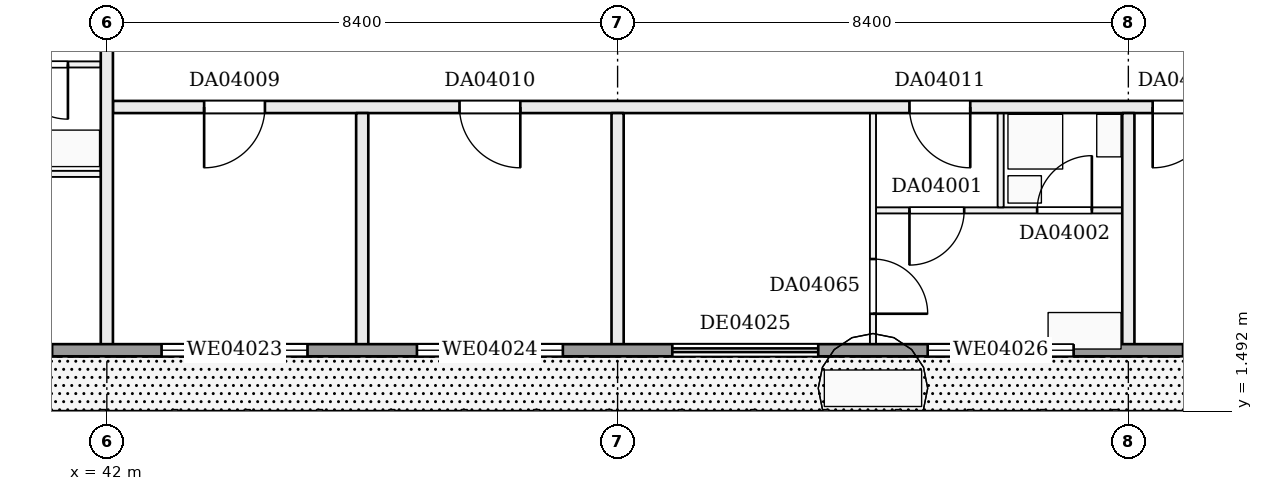
"""IFC4 building model, lengths in metres.
Left out: names, types, materials, properties, quantities, classifications, styles, units other than length and angle.
Written with IfcOpenShell. Run it as: python <this file> out.ifc"""

import sys

from ifc_helpers import new_model, si_unit, direction, frame, frame_2d, origin, place, context, subcontext, project, spatial, rectangle, extrude, element, fill, save


model = new_model("IFC4")
c1 = context("Model", 3, precision=1e-05, world=origin(), true_north=direction((0.0, 1.0)))
c2 = subcontext(c1, "Body", "Model", "MODEL_VIEW")
j1 = project(units=[si_unit("LENGTHUNIT", "METRE"), si_unit("PLANEANGLEUNIT", "RADIAN")], contexts=[c1])
p1 = place(None, origin())
s1 = spatial("IfcSite", under=j1, at=p1, CompositionType="ELEMENT")
p2 = place(p1, origin())
s2 = spatial("IfcBuilding", under=s1, at=p2, CompositionType="ELEMENT")
p3 = place(p2, frame((0.0, 0.0, 25.2)))
s3 = spatial("IfcBuildingStorey", under=s2, at=p3, CompositionType="ELEMENT", Elevation=25.2)
p4 = place(p3, frame((54.65, 4.8, 0.0), z_axis=(0.0, 0.0, 1.0), x_axis=(1.0, 0.0, 0.0)))
e1 = element("IfcWall", 1, at=p4, inside=s3, PredefinedType="PARTITIONING", context=c2, shape_type="SweptSolid", body=[
    extrude(rectangle(XDim=4.05, YDim=0.1, at=frame_2d((2.025, 0.0))), origin(), (0.0, 0.0, 1.0), 3.22),
])
p5 = place(p4, frame((0.55, 0.0, 0.0)))
e2 = element("IfcOpeningElement", 2, at=p5, cuts=e1, PredefinedType="OPENING", context=c2, shape_type="SweptSolid", body=[
    extrude(rectangle(XDim=0.9, YDim=2.1, at=frame_2d((0.45, 1.05))), frame((0.0, 0.06, 0.0), z_axis=(0.0, -1.0, 0.0), x_axis=(1.0, 0.0, 0.0)), (0.0, 0.0, 1.0), 0.12),
])
p6 = place(p4, frame((2.65, 0.0, 0.0)))
e3 = element("IfcOpeningElement", 3, at=p6, cuts=e1, PredefinedType="OPENING", context=c2, shape_type="SweptSolid", body=[
    extrude(rectangle(XDim=0.9, YDim=2.1, at=frame_2d((0.45, 1.05))), frame((0.0, 0.06, 0.0), z_axis=(0.0, -1.0, 0.0), x_axis=(1.0, 0.0, 0.0)), (0.0, 0.0, 1.0), 0.12),
])
p7 = place(p3, frame((37.9, 5.4, 0.0), z_axis=(0.0, 0.0, 1.0), x_axis=(1.0, 0.0, 0.0)))
e4 = element("IfcWall", 4, at=p7, inside=s3, PredefinedType="PARTITIONING", context=c2, shape_type="SweptSolid", body=[
    extrude(rectangle(XDim=4.0, YDim=0.1, at=frame_2d((2.0, 0.0))), origin(), (0.0, 0.0, 1.0), 3.22),
])
p8 = place(p7, frame((1.5, 0.0, 0.0)))
e5 = element("IfcOpeningElement", 5, at=p8, cuts=e4, PredefinedType="OPENING", context=c2, shape_type="SweptSolid", body=[
    extrude(rectangle(XDim=0.9, YDim=2.1, at=frame_2d((0.45, 1.05))), frame((0.0, 0.06, 0.0), z_axis=(0.0, -1.0, 0.0), x_axis=(1.0, 0.0, 0.0)), (0.0, 0.0, 1.0), 0.12),
])
p9 = place(p3, frame((42.1, 6.5, 0.0), z_axis=(0.0, 0.0, 1.0), x_axis=(1.0, 0.0, 0.0)))
e6 = element("IfcWall", 6, at=p9, inside=s3, PredefinedType="PARTITIONING", context=c2, shape_type="SweptSolid", body=[
    extrude(rectangle(XDim=18.7, YDim=0.2, at=frame_2d((9.35, 0.0))), origin(), (0.0, 0.0, 1.0), 3.22),
])
p10 = place(p9, frame((1.5, 0.0, 0.0)))
e7 = element("IfcOpeningElement", 7, at=p10, cuts=e6, PredefinedType="OPENING", context=c2, shape_type="SweptSolid", body=[
    extrude(rectangle(XDim=1.0, YDim=2.1, at=frame_2d((0.5, 1.05))), frame((0.0, 0.11, 0.0), z_axis=(0.0, -1.0, 0.0), x_axis=(1.0, 0.0, 0.0)), (0.0, 0.0, 1.0), 0.22),
])
p11 = place(p9, frame((5.7, 0.0, 0.0)))
e8 = element("IfcOpeningElement", 8, at=p11, cuts=e6, PredefinedType="OPENING", context=c2, shape_type="SweptSolid", body=[
    extrude(rectangle(XDim=1.0, YDim=2.1, at=frame_2d((0.5, 1.05))), frame((0.0, 0.11, 0.0), z_axis=(0.0, -1.0, 0.0), x_axis=(1.0, 0.0, 0.0)), (0.0, 0.0, 1.0), 0.22),
])
p12 = place(p9, frame((13.1, 0.0, 0.0)))
e9 = element("IfcOpeningElement", 9, at=p12, cuts=e6, PredefinedType="OPENING", context=c2, shape_type="SweptSolid", body=[
    extrude(rectangle(XDim=1.0, YDim=2.1, at=frame_2d((0.5, 1.05))), frame((0.0, 0.11, 0.0), z_axis=(0.0, -1.0, 0.0), x_axis=(1.0, 0.0, 0.0)), (0.0, 0.0, 1.0), 0.22),
])
p13 = place(p9, frame((17.1, 0.0, 0.0)))
e10 = element("IfcOpeningElement", 10, at=p13, cuts=e6, PredefinedType="OPENING", context=c2, shape_type="SweptSolid", body=[
    extrude(rectangle(XDim=1.0, YDim=2.1, at=frame_2d((0.5, 1.05))), frame((0.0, 0.11, 0.0), z_axis=(0.0, -1.0, 0.0), x_axis=(1.0, 0.0, 0.0)), (0.0, 0.0, 1.0), 0.22),
])
p14 = place(p3, frame((37.9, 7.2, 0.0), z_axis=(0.0, 0.0, 1.0), x_axis=(1.0, 0.0, 0.0)))
e11 = element("IfcWall", 11, at=p14, inside=s3, PredefinedType="PARTITIONING", context=c2, shape_type="SweptSolid", body=[
    extrude(rectangle(XDim=4.0, YDim=0.1, at=frame_2d((2.0, 0.0))), origin(), (0.0, 0.0, 1.0), 3.22),
])
p15 = place(p14, frame((0.4, 0.0, 0.0)))
e12 = element("IfcOpeningElement", 12, at=p15, cuts=e11, PredefinedType="OPENING", context=c2, shape_type="SweptSolid", body=[
    extrude(rectangle(XDim=0.9, YDim=2.1, at=frame_2d((0.45, 1.05))), frame((0.0, 0.06, 0.0), z_axis=(0.0, -1.0, 0.0), x_axis=(1.0, 0.0, 0.0)), (0.0, 0.0, 1.0), 0.12),
])
p16 = place(p14, frame((2.56, 0.0, 0.0)))
e13 = element("IfcOpeningElement", 13, at=p16, cuts=e11, PredefinedType="OPENING", context=c2, shape_type="SweptSolid", body=[
    extrude(rectangle(XDim=0.9, YDim=2.1, at=frame_2d((0.45, 1.05))), frame((0.0, 0.06, 0.0), z_axis=(0.0, -1.0, 0.0), x_axis=(1.0, 0.0, 0.0)), (0.0, 0.0, 1.0), 0.12),
])
p17 = place(p3, frame((42.0, 2.5, 0.0), z_axis=(0.0, 0.0, 1.0), x_axis=(0.0, 1.0, 0.0)))
e14 = element("IfcWall", 14, at=p17, inside=s3, PredefinedType="PARTITIONING", context=c2, shape_type="SweptSolid", body=[
    extrude(rectangle(XDim=5.9, YDim=0.2, at=frame_2d((2.95, 0.0))), origin(), (0.0, 0.0, 1.0), 3.22),
])
for number, where, z_axis, x_axis in (
    (15, (46.2, 2.5, 0.0), (0.0, 0.0, 1.0), (0.0, 1.0, 0.0)),
    (16, (50.4, 2.5, 0.0), (0.0, 0.0, 1.0), (0.0, 1.0, 0.0)),
):
    element("IfcWall", number, at=place(p3, frame(where, z_axis=z_axis, x_axis=x_axis)), inside=s3, PredefinedType="PARTITIONING", context=c2, shape_type="SweptSolid", body=[
        extrude(rectangle(XDim=3.9, YDim=0.2, at=frame_2d((1.95, 0.0))), origin(), (0.0, 0.0, 1.0), 3.22),
    ])
p18 = place(p3, frame((54.6, 2.5, 0.0), z_axis=(0.0, 0.0, 1.0), x_axis=(0.0, 1.0, 0.0)))
e17 = element("IfcWall", 17, at=p18, inside=s3, PredefinedType="PARTITIONING", context=c2, shape_type="SweptSolid", body=[
    extrude(rectangle(XDim=3.9, YDim=0.1, at=frame_2d((1.95, 0.0))), origin(), (0.0, 0.0, 1.0), 3.22),
])
p19 = place(p18, frame((0.6, 0.0, 0.0)))
e18 = element("IfcOpeningElement", 18, at=p19, cuts=e17, PredefinedType="OPENING", context=c2, shape_type="SweptSolid", body=[
    extrude(rectangle(XDim=0.9, YDim=2.1, at=frame_2d((0.45, 1.05))), frame((0.0, 0.06, 0.0), z_axis=(0.0, -1.0, 0.0), x_axis=(1.0, 0.0, 0.0)), (0.0, 0.0, 1.0), 0.12),
])
p20 = place(p3, frame((56.7, 4.85, 0.0), z_axis=(0.0, 0.0, 1.0), x_axis=(0.0, 1.0, 0.0)))
e19 = element("IfcWall", 19, at=p20, inside=s3, PredefinedType="PARTITIONING", context=c2, shape_type="SweptSolid", body=[
    extrude(rectangle(XDim=1.55, YDim=0.1, at=frame_2d((0.775, 0.0))), origin(), (0.0, 0.0, 1.0), 3.22),
])
p21 = place(p3, frame((58.8, 2.5, 0.0), z_axis=(0.0, 0.0, 1.0), x_axis=(0.0, 1.0, 0.0)))
e20 = element("IfcWall", 20, at=p21, inside=s3, PredefinedType="PARTITIONING", context=c2, shape_type="SweptSolid", body=[
    extrude(rectangle(XDim=3.9, YDim=0.2, at=frame_2d((1.95, 0.0))), origin(), (0.0, 0.0, 1.0), 3.22),
])
p22 = place(p3, frame((4.8, 2.5, 0.0), z_axis=(0.0, 0.0, 1.0), x_axis=(1.0, 0.0, 0.0)))
e21 = element("IfcWall", 21, at=p22, inside=s3, PredefinedType="SOLIDWALL", context=c2, shape_type="SweptSolid", body=[
    extrude(rectangle(XDim=57.6, YDim=0.2, at=frame_2d((28.8, 0.0))), origin(), (0.0, 0.0, 1.0), 3.22),
])
p23 = place(p22, frame((0.3, 0.0, 0.0)))
e22 = element("IfcOpeningElement", 22, at=p23, cuts=e21, PredefinedType="OPENING", context=c2, shape_type="SweptSolid", body=[
    extrude(rectangle(XDim=2.4, YDim=2.2, at=frame_2d((1.2, 1.1))), frame((0.0, 0.11, 0.0), z_axis=(0.0, -1.0, 0.0), x_axis=(1.0, 0.0, 0.0)), (0.0, 0.0, 1.0), 0.22),
])
p24 = place(p22, frame((4.5, 0.0, 0.0)))
e23 = element("IfcOpeningElement", 23, at=p24, cuts=e21, PredefinedType="OPENING", context=c2, shape_type="SweptSolid", body=[
    extrude(rectangle(XDim=2.4, YDim=2.2, at=frame_2d((1.2, 1.1))), frame((0.0, 0.11, 0.0), z_axis=(0.0, -1.0, 0.0), x_axis=(1.0, 0.0, 0.0)), (0.0, 0.0, 1.0), 0.22),
])
p25 = place(p22, frame((8.7, 0.0, 0.9)))
e24 = element("IfcOpeningElement", 24, at=p25, cuts=e21, PredefinedType="OPENING", context=c2, shape_type="SweptSolid", body=[
    extrude(rectangle(XDim=2.4, YDim=1.5, at=frame_2d((1.2, 0.75))), frame((0.0, 0.11, 0.0), z_axis=(0.0, -1.0, 0.0), x_axis=(1.0, 0.0, 0.0)), (0.0, 0.0, 1.0), 0.22),
])
p26 = place(p22, frame((12.9, 0.0, 0.9)))
e25 = element("IfcOpeningElement", 25, at=p26, cuts=e21, PredefinedType="OPENING", context=c2, shape_type="SweptSolid", body=[
    extrude(rectangle(XDim=2.4, YDim=1.5, at=frame_2d((1.2, 0.75))), frame((0.0, 0.11, 0.0), z_axis=(0.0, -1.0, 0.0), x_axis=(1.0, 0.0, 0.0)), (0.0, 0.0, 1.0), 0.22),
])
p27 = place(p22, frame((17.1, 0.0, 0.0)))
e26 = element("IfcOpeningElement", 26, at=p27, cuts=e21, PredefinedType="OPENING", context=c2, shape_type="SweptSolid", body=[
    extrude(rectangle(XDim=2.4, YDim=2.2, at=frame_2d((1.2, 1.1))), frame((0.0, 0.11, 0.0), z_axis=(0.0, -1.0, 0.0), x_axis=(1.0, 0.0, 0.0)), (0.0, 0.0, 1.0), 0.22),
])
p28 = place(p22, frame((21.3, 0.0, 0.9)))
e27 = element("IfcOpeningElement", 27, at=p28, cuts=e21, PredefinedType="OPENING", context=c2, shape_type="SweptSolid", body=[
    extrude(rectangle(XDim=2.4, YDim=1.5, at=frame_2d((1.2, 0.75))), frame((0.0, 0.11, 0.0), z_axis=(0.0, -1.0, 0.0), x_axis=(1.0, 0.0, 0.0)), (0.0, 0.0, 1.0), 0.22),
])
p29 = place(p22, frame((25.5, 0.0, 0.9)))
e28 = element("IfcOpeningElement", 28, at=p29, cuts=e21, PredefinedType="OPENING", context=c2, shape_type="SweptSolid", body=[
    extrude(rectangle(XDim=2.4, YDim=1.5, at=frame_2d((1.2, 0.75))), frame((0.0, 0.11, 0.0), z_axis=(0.0, -1.0, 0.0), x_axis=(1.0, 0.0, 0.0)), (0.0, 0.0, 1.0), 0.22),
])
p30 = place(p22, frame((29.7, 0.0, 0.9)))
e29 = element("IfcOpeningElement", 29, at=p30, cuts=e21, PredefinedType="OPENING", context=c2, shape_type="SweptSolid", body=[
    extrude(rectangle(XDim=2.4, YDim=1.5, at=frame_2d((1.2, 0.75))), frame((0.0, 0.11, 0.0), z_axis=(0.0, -1.0, 0.0), x_axis=(1.0, 0.0, 0.0)), (0.0, 0.0, 1.0), 0.22),
])
p31 = place(p22, frame((33.9, 0.0, 0.0)))
e30 = element("IfcOpeningElement", 30, at=p31, cuts=e21, PredefinedType="OPENING", context=c2, shape_type="SweptSolid", body=[
    extrude(rectangle(XDim=2.4, YDim=2.2, at=frame_2d((1.2, 1.1))), frame((0.0, 0.11, 0.0), z_axis=(0.0, -1.0, 0.0), x_axis=(1.0, 0.0, 0.0)), (0.0, 0.0, 1.0), 0.22),
])
p32 = place(p22, frame((38.1, 0.0, 0.9)))
e31 = element("IfcOpeningElement", 31, at=p32, cuts=e21, PredefinedType="OPENING", context=c2, shape_type="SweptSolid", body=[
    extrude(rectangle(XDim=2.4, YDim=1.5, at=frame_2d((1.2, 0.75))), frame((0.0, 0.11, 0.0), z_axis=(0.0, -1.0, 0.0), x_axis=(1.0, 0.0, 0.0)), (0.0, 0.0, 1.0), 0.22),
])
p33 = place(p22, frame((42.3, 0.0, 0.9)))
e32 = element("IfcOpeningElement", 32, at=p33, cuts=e21, PredefinedType="OPENING", context=c2, shape_type="SweptSolid", body=[
    extrude(rectangle(XDim=2.4, YDim=1.5, at=frame_2d((1.2, 0.75))), frame((0.0, 0.11, 0.0), z_axis=(0.0, -1.0, 0.0), x_axis=(1.0, 0.0, 0.0)), (0.0, 0.0, 1.0), 0.22),
])
p34 = place(p22, frame((46.5, 0.0, 0.0)))
e33 = element("IfcOpeningElement", 33, at=p34, cuts=e21, PredefinedType="OPENING", context=c2, shape_type="SweptSolid", body=[
    extrude(rectangle(XDim=2.4, YDim=2.2, at=frame_2d((1.2, 1.1))), frame((0.0, 0.11, 0.0), z_axis=(0.0, -1.0, 0.0), x_axis=(1.0, 0.0, 0.0)), (0.0, 0.0, 1.0), 0.22),
])
p35 = place(p22, frame((50.7, 0.0, 0.9)))
e34 = element("IfcOpeningElement", 34, at=p35, cuts=e21, PredefinedType="OPENING", context=c2, shape_type="SweptSolid", body=[
    extrude(rectangle(XDim=2.4, YDim=1.5, at=frame_2d((1.2, 0.75))), frame((0.0, 0.11, 0.0), z_axis=(0.0, -1.0, 0.0), x_axis=(1.0, 0.0, 0.0)), (0.0, 0.0, 1.0), 0.22),
])
p36 = place(p22, frame((54.9, 0.0, 0.9)))
e35 = element("IfcOpeningElement", 35, at=p36, cuts=e21, PredefinedType="OPENING", context=c2, shape_type="SweptSolid", body=[
    extrude(rectangle(XDim=2.4, YDim=1.5, at=frame_2d((1.2, 0.75))), frame((0.0, 0.11, 0.0), z_axis=(0.0, -1.0, 0.0), x_axis=(1.0, 0.0, 0.0)), (0.0, 0.0, 1.0), 0.22),
])
p37 = place(p5, frame((0.9, 0.0, 0.0), z_axis=(0.0, 0.0, 1.0), x_axis=(-1.0, 0.0, 0.0)))
e36 = element("IfcDoor", 36, at=p37, inside=s3, OperationType="SINGLE_SWING_RIGHT", PredefinedType="DOOR", context=c2, shape_type="SweptSolid", body=[
    extrude(rectangle(XDim=0.9, YDim=2.1, at=frame_2d((0.45, 1.05))), frame((0.0, 0.025, 0.0), z_axis=(0.0, -1.0, 0.0), x_axis=(1.0, 0.0, 0.0)), (0.0, 0.0, 1.0), 0.05),
])
fill(e2, e36)
p38 = place(p6, origin())
e37 = element("IfcDoor", 37, at=p38, inside=s3, OperationType="SINGLE_SWING_RIGHT", PredefinedType="DOOR", context=c2, shape_type="SweptSolid", body=[
    extrude(rectangle(XDim=0.9, YDim=2.1, at=frame_2d((0.45, 1.05))), frame((0.0, 0.025, 0.0), z_axis=(0.0, -1.0, 0.0), x_axis=(1.0, 0.0, 0.0)), (0.0, 0.0, 1.0), 0.05),
])
fill(e3, e37)
p39 = place(p10, frame((1.0, 0.0, 0.0), z_axis=(0.0, 0.0, 1.0), x_axis=(-1.0, 0.0, 0.0)))
e38 = element("IfcDoor", 38, at=p39, inside=s3, OperationType="SINGLE_SWING_RIGHT", PredefinedType="DOOR", context=c2, shape_type="SweptSolid", body=[
    extrude(rectangle(XDim=1.0, YDim=2.1, at=frame_2d((0.5, 1.05))), frame((0.0, 0.025, 0.0), z_axis=(0.0, -1.0, 0.0), x_axis=(1.0, 0.0, 0.0)), (0.0, 0.0, 1.0), 0.05),
])
fill(e7, e38)
p40 = place(p11, frame((1.0, 0.0, 0.0), z_axis=(0.0, 0.0, 1.0), x_axis=(-1.0, 0.0, 0.0)))
e39 = element("IfcDoor", 39, at=p40, inside=s3, OperationType="SINGLE_SWING_LEFT", PredefinedType="DOOR", context=c2, shape_type="SweptSolid", body=[
    extrude(rectangle(XDim=1.0, YDim=2.1, at=frame_2d((0.5, 1.05))), frame((0.0, 0.025, 0.0), z_axis=(0.0, -1.0, 0.0), x_axis=(1.0, 0.0, 0.0)), (0.0, 0.0, 1.0), 0.05),
])
fill(e8, e39)
p41 = place(p12, frame((1.0, 0.0, 0.0), z_axis=(0.0, 0.0, 1.0), x_axis=(-1.0, 0.0, 0.0)))
e40 = element("IfcDoor", 40, at=p41, inside=s3, OperationType="SINGLE_SWING_LEFT", PredefinedType="DOOR", context=c2, shape_type="SweptSolid", body=[
    extrude(rectangle(XDim=1.0, YDim=2.1, at=frame_2d((0.5, 1.05))), frame((0.0, 0.025, 0.0), z_axis=(0.0, -1.0, 0.0), x_axis=(1.0, 0.0, 0.0)), (0.0, 0.0, 1.0), 0.05),
])
fill(e9, e40)
p42 = place(p13, frame((1.0, 0.0, 0.0), z_axis=(0.0, 0.0, 1.0), x_axis=(-1.0, 0.0, 0.0)))
e41 = element("IfcDoor", 41, at=p42, inside=s3, OperationType="SINGLE_SWING_RIGHT", PredefinedType="DOOR", context=c2, shape_type="SweptSolid", body=[
    extrude(rectangle(XDim=1.0, YDim=2.1, at=frame_2d((0.5, 1.05))), frame((0.0, 0.025, 0.0), z_axis=(0.0, -1.0, 0.0), x_axis=(1.0, 0.0, 0.0)), (0.0, 0.0, 1.0), 0.05),
])
fill(e10, e41)
p43 = place(p16, frame((0.9, 0.0, 0.0), z_axis=(0.0, 0.0, 1.0), x_axis=(-1.0, 0.0, 0.0)))
e42 = element("IfcDoor", 42, at=p43, inside=s3, OperationType="SINGLE_SWING_LEFT", PredefinedType="DOOR", context=c2, shape_type="SweptSolid", body=[
    extrude(rectangle(XDim=0.9, YDim=2.1, at=frame_2d((0.45, 1.05))), frame((0.0, 0.025, 0.0), z_axis=(0.0, -1.0, 0.0), x_axis=(1.0, 0.0, 0.0)), (0.0, 0.0, 1.0), 0.05),
])
fill(e13, e42)
p44 = place(p19, frame((0.9, 0.0, 0.0), z_axis=(0.0, 0.0, 1.0), x_axis=(-1.0, 0.0, 0.0)))
e43 = element("IfcDoor", 43, at=p44, inside=s3, OperationType="SINGLE_SWING_RIGHT", PredefinedType="DOOR", context=c2, shape_type="SweptSolid", body=[
    extrude(rectangle(XDim=0.9, YDim=2.1, at=frame_2d((0.45, 1.05))), frame((0.0, 0.025, 0.0), z_axis=(0.0, -1.0, 0.0), x_axis=(1.0, 0.0, 0.0)), (0.0, 0.0, 1.0), 0.05),
])
fill(e18, e43)
p45 = place(p32, origin())
e44 = element("IfcWindow", 44, at=p45, inside=s3, PartitioningType="SINGLE_PANEL", PredefinedType="WINDOW", context=c2, shape_type="SweptSolid", body=[
    extrude(rectangle(XDim=2.4, YDim=1.5, at=frame_2d((1.2, 0.75))), frame((0.0, 0.03, 0.0), z_axis=(0.0, -1.0, 0.0), x_axis=(1.0, 0.0, 0.0)), (0.0, 0.0, 1.0), 0.06),
])
fill(e31, e44)
p46 = place(p33, origin())
e45 = element("IfcWindow", 45, at=p46, inside=s3, PartitioningType="SINGLE_PANEL", PredefinedType="WINDOW", context=c2, shape_type="SweptSolid", body=[
    extrude(rectangle(XDim=2.4, YDim=1.5, at=frame_2d((1.2, 0.75))), frame((0.0, 0.03, 0.0), z_axis=(0.0, -1.0, 0.0), x_axis=(1.0, 0.0, 0.0)), (0.0, 0.0, 1.0), 0.06),
])
fill(e32, e45)
p47 = place(p34, origin())
e46 = element("IfcDoor", 46, at=p47, inside=s3, OperationType="DOUBLE_DOOR_SLIDING", PredefinedType="DOOR", context=c2, shape_type="SweptSolid", body=[
    extrude(rectangle(XDim=2.4, YDim=2.2, at=frame_2d((1.2, 1.1))), frame((0.0, 0.025, 0.0), z_axis=(0.0, -1.0, 0.0), x_axis=(1.0, 0.0, 0.0)), (0.0, 0.0, 1.0), 0.05),
])
fill(e33, e46)
p48 = place(p35, origin())
e47 = element("IfcWindow", 47, at=p48, inside=s3, PartitioningType="SINGLE_PANEL", PredefinedType="WINDOW", context=c2, shape_type="SweptSolid", body=[
    extrude(rectangle(XDim=2.4, YDim=1.5, at=frame_2d((1.2, 0.75))), frame((0.0, 0.03, 0.0), z_axis=(0.0, -1.0, 0.0), x_axis=(1.0, 0.0, 0.0)), (0.0, 0.0, 1.0), 0.06),
])
fill(e34, e47)
save(model, sys.argv[1])
